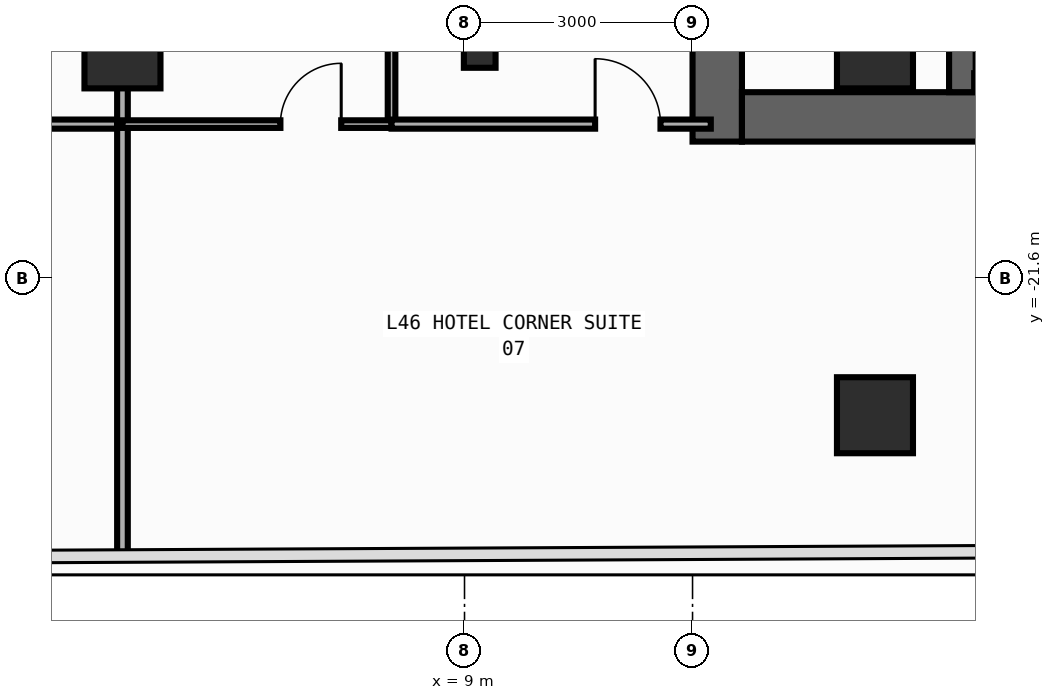
"""IFC4 building model, lengths in metres.
Left out: names, types, materials, properties, quantities, classifications, styles, units other than length and angle.
Written with IfcOpenShell. Run it as: python <this file> out.ifc"""

import sys

from ifc_helpers import new_model, si_unit, direction, frame, frame_2d, origin, origin_2d, place, context, subcontext, project, spatial, rectangle, i_section, extrude, element, fill, save


model = new_model("IFC4")
c1 = context("Model", 3, precision=1e-05, world=origin(), true_north=direction((0.0, 1.0)))
c2 = subcontext(c1, "Body", "Model", "MODEL_VIEW")
j1 = project(units=[si_unit("LENGTHUNIT", "METRE"), si_unit("PLANEANGLEUNIT", "RADIAN")], contexts=[c1])
p1 = place(None, origin())
s1 = spatial("IfcSite", under=j1, at=p1, CompositionType="ELEMENT")
p2 = place(p1, origin())
s2 = spatial("IfcBuilding", under=s1, at=p2, CompositionType="ELEMENT")
p3 = place(p2, frame((0.0, 0.0, 199.2)))
s3 = spatial("IfcBuildingStorey", under=s2, at=p3, CompositionType="ELEMENT", Elevation=199.2)
p4 = place(p3, frame((12.325, -19.8, 0.0), z_axis=(0.0, 0.0, 1.0), x_axis=(0.0, 1.0, 0.0)))
e1 = element("IfcWall", 1, at=p4, inside=s3, PredefinedType="SHEAR", context=c2, shape_type="SweptSolid", body=[
    extrude(rectangle(XDim=27.0, YDim=0.65, at=frame_2d((13.5, 0.0))), origin(), (0.0, 0.0, 1.0), 3.54),
])
p5 = place(p4, frame((23.05, 0.0, 0.0)))
e2 = element("IfcOpeningElement", 2, at=p5, cuts=e1, PredefinedType="OPENING", context=c2, shape_type="SweptSolid", body=[
    extrude(rectangle(XDim=1.1, YDim=2.2, at=frame_2d((0.55, 1.1))), frame((0.0, 0.335, 0.0), z_axis=(0.0, -1.0, 0.0), x_axis=(1.0, 0.0, 0.0)), (0.0, 0.0, 1.0), 0.67),
])
p6 = place(p4, frame((19.85, 0.0, 0.0)))
e3 = element("IfcOpeningElement", 3, at=p6, cuts=e1, PredefinedType="OPENING", context=c2, shape_type="SweptSolid", body=[
    extrude(rectangle(XDim=1.1, YDim=2.2, at=frame_2d((0.55, 1.1))), frame((0.0, 0.335, 0.0), z_axis=(0.0, -1.0, 0.0), x_axis=(1.0, 0.0, 0.0)), (0.0, 0.0, 1.0), 0.67),
])
p7 = place(p4, frame((16.65, 0.0, 0.0)))
e4 = element("IfcOpeningElement", 4, at=p7, cuts=e1, PredefinedType="OPENING", context=c2, shape_type="SweptSolid", body=[
    extrude(rectangle(XDim=1.1, YDim=2.2, at=frame_2d((0.55, 1.1))), frame((0.0, 0.335, 0.0), z_axis=(0.0, -1.0, 0.0), x_axis=(1.0, 0.0, 0.0)), (0.0, 0.0, 1.0), 0.67),
])
p8 = place(p4, frame((6.275, 0.0, 0.0)))
e5 = element("IfcOpeningElement", 5, at=p8, cuts=e1, PredefinedType="OPENING", context=c2, shape_type="SweptSolid", body=[
    extrude(rectangle(XDim=0.85, YDim=2.1, at=frame_2d((0.425, 1.05))), frame((0.0, 0.335, 0.0), z_axis=(0.0, -1.0, 0.0), x_axis=(1.0, 0.0, 0.0)), (0.0, 0.0, 1.0), 0.67),
])
p9 = place(p4, frame((8.575, 0.0, 0.0)))
e6 = element("IfcOpeningElement", 6, at=p9, cuts=e1, PredefinedType="OPENING", context=c2, shape_type="SweptSolid", body=[
    extrude(rectangle(XDim=0.85, YDim=2.1, at=frame_2d((0.425, 1.05))), frame((0.0, 0.335, 0.0), z_axis=(0.0, -1.0, 0.0), x_axis=(1.0, 0.0, 0.0)), (0.0, 0.0, 1.0), 0.67),
])
p10 = place(p4, frame((10.675, 0.0, 0.0)))
e7 = element("IfcOpeningElement", 7, at=p10, cuts=e1, PredefinedType="OPENING", context=c2, shape_type="SweptSolid", body=[
    extrude(rectangle(XDim=0.85, YDim=2.1, at=frame_2d((0.425, 1.05))), frame((0.0, 0.335, 0.0), z_axis=(0.0, -1.0, 0.0), x_axis=(1.0, 0.0, 0.0)), (0.0, 0.0, 1.0), 0.67),
])
p11 = place(p4, frame((12.725, 0.0, 0.0)))
e8 = element("IfcOpeningElement", 8, at=p11, cuts=e1, PredefinedType="OPENING", context=c2, shape_type="SweptSolid", body=[
    extrude(rectangle(XDim=1.15, YDim=2.2, at=frame_2d((0.575, 1.1))), frame((0.0, 0.335, 0.0), z_axis=(0.0, -1.0, 0.0), x_axis=(1.0, 0.0, 0.0)), (0.0, 0.0, 1.0), 0.67),
])
p12 = place(p4, frame((25.125, 0.0, 0.0)))
e9 = element("IfcOpeningElement", 9, at=p12, cuts=e1, PredefinedType="OPENING", context=c2, shape_type="SweptSolid", body=[
    extrude(rectangle(XDim=0.85, YDim=2.1, at=frame_2d((0.425, 1.05))), frame((0.0, 0.335, 0.0), z_axis=(0.0, -1.0, 0.0), x_axis=(1.0, 0.0, 0.0)), (0.0, 0.0, 1.0), 0.67),
])
p13 = place(p3, frame((12.65, -19.475, 0.0), z_axis=(0.0, 0.0, 1.0), x_axis=(1.0, 0.0, 0.0)))
e10 = element("IfcWall", 10, at=p13, inside=s3, PredefinedType="SHEAR", context=c2, shape_type="SweptSolid", body=[
    extrude(rectangle(XDim=7.1, YDim=0.65, at=frame_2d((3.55, 0.0))), origin(), (0.0, 0.0, 1.0), 3.54),
])
p14 = place(p3, frame((15.55, -19.15, 0.0), z_axis=(0.0, 0.0, 1.0), x_axis=(0.0, 1.0, 0.0)))
e11 = element("IfcWall", 11, at=p14, inside=s3, PredefinedType="SHEAR", context=c2, shape_type="SweptSolid", body=[
    extrude(rectangle(XDim=25.7, YDim=0.35, at=frame_2d((12.85, 0.0))), origin(), (0.0, 0.0, 1.0), 3.54),
])
p15 = place(p14, frame((12.075, 0.0, 0.0)))
e12 = element("IfcOpeningElement", 12, at=p15, cuts=e11, PredefinedType="OPENING", context=c2, shape_type="SweptSolid", body=[
    extrude(rectangle(XDim=1.15, YDim=2.2, at=frame_2d((0.575, 1.1))), frame((0.0, 0.185, 0.0), z_axis=(0.0, -1.0, 0.0), x_axis=(1.0, 0.0, 0.0)), (0.0, 0.0, 1.0), 0.37),
])
p16 = place(p14, frame((24.475, 0.0, 0.0)))
e13 = element("IfcOpeningElement", 13, at=p16, cuts=e11, PredefinedType="OPENING", context=c2, shape_type="SweptSolid", body=[
    extrude(rectangle(XDim=0.85, YDim=2.1, at=frame_2d((0.425, 1.05))), frame((0.0, 0.185, 0.0), z_axis=(0.0, -1.0, 0.0), x_axis=(1.0, 0.0, 0.0)), (0.0, 0.0, 1.0), 0.37),
])
p17 = place(p3, frame((15.705, -19.01, 0.0), z_axis=(0.0, 0.0, 1.0), x_axis=(1.0, 0.0, 0.0)))
e14 = element("IfcWall", 14, at=p17, inside=s3, PredefinedType="SHEAR", context=c2, shape_type="SweptSolid", body=[
    extrude(rectangle(XDim=4.065, YDim=0.22, at=frame_2d((2.032, 0.0))), origin(), (0.0, 0.0, 1.0), 3.54),
])
p18 = place(p3, frame((9.2, -18.6, 0.0), z_axis=(0.0, 0.0, 1.0), x_axis=(1.0, 0.0, 0.0)))
e15 = element("IfcColumn", 15, at=p18, inside=s3, PredefinedType="COLUMN", context=c2, shape_type="SweptSolid", body=[
    extrude(i_section(OverallWidth=0.417, OverallDepth=0.458, WebThickness=0.03, FlangeThickness=0.05, FilletRadius=0.022, at=origin_2d()), origin(), (0.0, 0.0, 1.0), 3.8),
])
for number, where, z_axis, x_axis in (
    (16, (14.4, -18.6, 0.0), (0.0, 0.0, 1.0), (1.0, 0.0, 0.0)),
    (17, (4.5, -18.6, 0.0), (0.0, 0.0, 1.0), (1.0, 0.0, 0.0)),
    (18, (14.4, -23.4, 0.0), (0.0, 0.0, 1.0), (1.0, 0.0, 0.0)),
):
    element("IfcColumn", number, at=place(p3, frame(where, z_axis=z_axis, x_axis=x_axis)), inside=s3, PredefinedType="COLUMN", context=c2, shape_type="SweptSolid", body=[
        extrude(rectangle(XDim=1.0, YDim=1.0, at=origin_2d()), origin(), (0.0, 0.0, 1.0), 3.8),
    ])
p19 = place(p3, frame((-5.46, -19.57, 0.0), z_axis=(0.0, 0.0, 1.0), x_axis=(1.0, 0.0, 0.0)))
e19 = element("IfcWall", 19, at=p19, inside=s3, PredefinedType="PARTITIONING", context=c2, shape_type="SweptSolid", body=[
    extrude(rectangle(XDim=9.96, YDim=0.12, at=frame_2d((4.98, 0.0))), origin(), (0.0, 0.0, 1.0), 3.54),
])
p20 = place(p19, frame((2.709, 0.0, 0.0)))
e20 = element("IfcOpeningElement", 20, at=p20, cuts=e19, PredefinedType="OPENING", context=c2, shape_type="SweptSolid", body=[
    extrude(rectangle(XDim=0.86, YDim=2.15, at=frame_2d((0.43, 1.075))), frame((0.0, 0.07, 0.0), z_axis=(0.0, -1.0, 0.0), x_axis=(1.0, 0.0, 0.0)), (0.0, 0.0, 1.0), 0.14),
])
p21 = place(p3, frame((4.5, -19.57, 0.0), z_axis=(0.0, 0.0, 1.0), x_axis=(0.0, 1.0, 0.0)))
e21 = element("IfcWall", 21, at=p21, inside=s3, PredefinedType="PARTITIONING", context=c2, shape_type="SweptSolid", body=[
    extrude(rectangle(XDim=3.015, YDim=0.14, at=frame_2d((1.508, 0.0))), origin(), (0.0, 0.0, 1.0), 3.54),
])
p22 = place(p3, frame((4.5, -25.248, 0.0), z_axis=(0.0, 0.0, 1.0), x_axis=(0.0, 1.0, 0.0)))
e22 = element("IfcWall", 22, at=p22, inside=s3, PredefinedType="PARTITIONING", context=c2, shape_type="SweptSolid", body=[
    extrude(rectangle(XDim=5.677, YDim=0.14, at=frame_2d((2.839, 0.0))), origin(), (0.0, 0.0, 1.0), 3.54),
])
p23 = place(p3, frame((8.04, -19.52, 0.0), z_axis=(0.0, 0.0, 1.0), x_axis=(0.0, 1.0, 0.0)))
e23 = element("IfcWall", 23, at=p23, inside=s3, PredefinedType="PARTITIONING", context=c2, shape_type="SweptSolid", body=[
    extrude(rectangle(XDim=2.965, YDim=0.1, at=frame_2d((1.482, 0.0))), origin(), (0.0, 0.0, 1.0), 3.54),
])
p24 = place(p23, frame((1.705, 0.0, 0.0)))
e24 = element("IfcOpeningElement", 24, at=p24, cuts=e23, PredefinedType="OPENING", context=c2, shape_type="SweptSolid", body=[
    extrude(rectangle(XDim=0.8, YDim=2.1, at=frame_2d((0.4, 1.05))), frame((0.0, 0.06, 0.0), z_axis=(0.0, -1.0, 0.0), x_axis=(1.0, 0.0, 0.0)), (0.0, 0.0, 1.0), 0.12),
])
p25 = place(p3, frame((4.5, -19.57, 0.0), z_axis=(0.0, 0.0, 1.0), x_axis=(1.0, 0.0, 0.0)))
e25 = element("IfcWall", 25, at=p25, inside=s3, PredefinedType="PARTITIONING", context=c2, shape_type="SweptSolid", body=[
    extrude(rectangle(XDim=3.54, YDim=0.1, at=frame_2d((1.77, 0.0))), origin(), (0.0, 0.0, 1.0), 3.54),
])
p26 = place(p25, frame((2.078, 0.0, 0.0)))
e26 = element("IfcOpeningElement", 26, at=p26, cuts=e25, PredefinedType="OPENING", context=c2, shape_type="SweptSolid", body=[
    extrude(rectangle(XDim=0.8, YDim=2.1, at=frame_2d((0.4, 1.05))), frame((0.0, 0.06, 0.0), z_axis=(0.0, -1.0, 0.0), x_axis=(1.0, 0.0, 0.0)), (0.0, 0.0, 1.0), 0.12),
])
p27 = place(p3, frame((8.04, -19.57, 0.0), z_axis=(0.0, 0.0, 1.0), x_axis=(1.0, 0.0, 0.0)))
e27 = element("IfcWall", 27, at=p27, inside=s3, PredefinedType="PARTITIONING", context=c2, shape_type="SweptSolid", body=[
    extrude(rectangle(XDim=4.2, YDim=0.12, at=frame_2d((2.1, 0.0))), origin(), (0.0, 0.0, 1.0), 3.54),
])
p28 = place(p27, frame((2.678, 0.0, 0.0)))
e28 = element("IfcOpeningElement", 28, at=p28, cuts=e27, PredefinedType="OPENING", context=c2, shape_type="SweptSolid", body=[
    extrude(rectangle(XDim=0.86, YDim=2.15, at=frame_2d((0.43, 1.075))), frame((0.0, 0.07, 0.0), z_axis=(0.0, -1.0, 0.0), x_axis=(1.0, 0.0, 0.0)), (0.0, 0.0, 1.0), 0.14),
])
p29 = place(p26, origin())
e29 = element("IfcDoor", 29, at=p29, inside=s3, OperationType="SINGLE_SWING_RIGHT", PredefinedType="DOOR", context=c2, shape_type="SweptSolid", body=[
    extrude(rectangle(XDim=0.8, YDim=2.1, at=frame_2d((0.4, 1.05))), frame((0.0, 0.025, 0.0), z_axis=(0.0, -1.0, 0.0), x_axis=(1.0, 0.0, 0.0)), (0.0, 0.0, 1.0), 0.05),
])
fill(e26, e29)
p30 = place(p28, origin())
e30 = element("IfcDoor", 30, at=p30, inside=s3, OperationType="SINGLE_SWING_LEFT", PredefinedType="DOOR", context=c2, shape_type="SweptSolid", body=[
    extrude(rectangle(XDim=0.86, YDim=2.15, at=frame_2d((0.43, 1.075))), frame((0.0, 0.025, 0.0), z_axis=(0.0, -1.0, 0.0), x_axis=(1.0, 0.0, 0.0)), (0.0, 0.0, 1.0), 0.05),
])
fill(e28, e30)
save(model, sys.argv[1])
